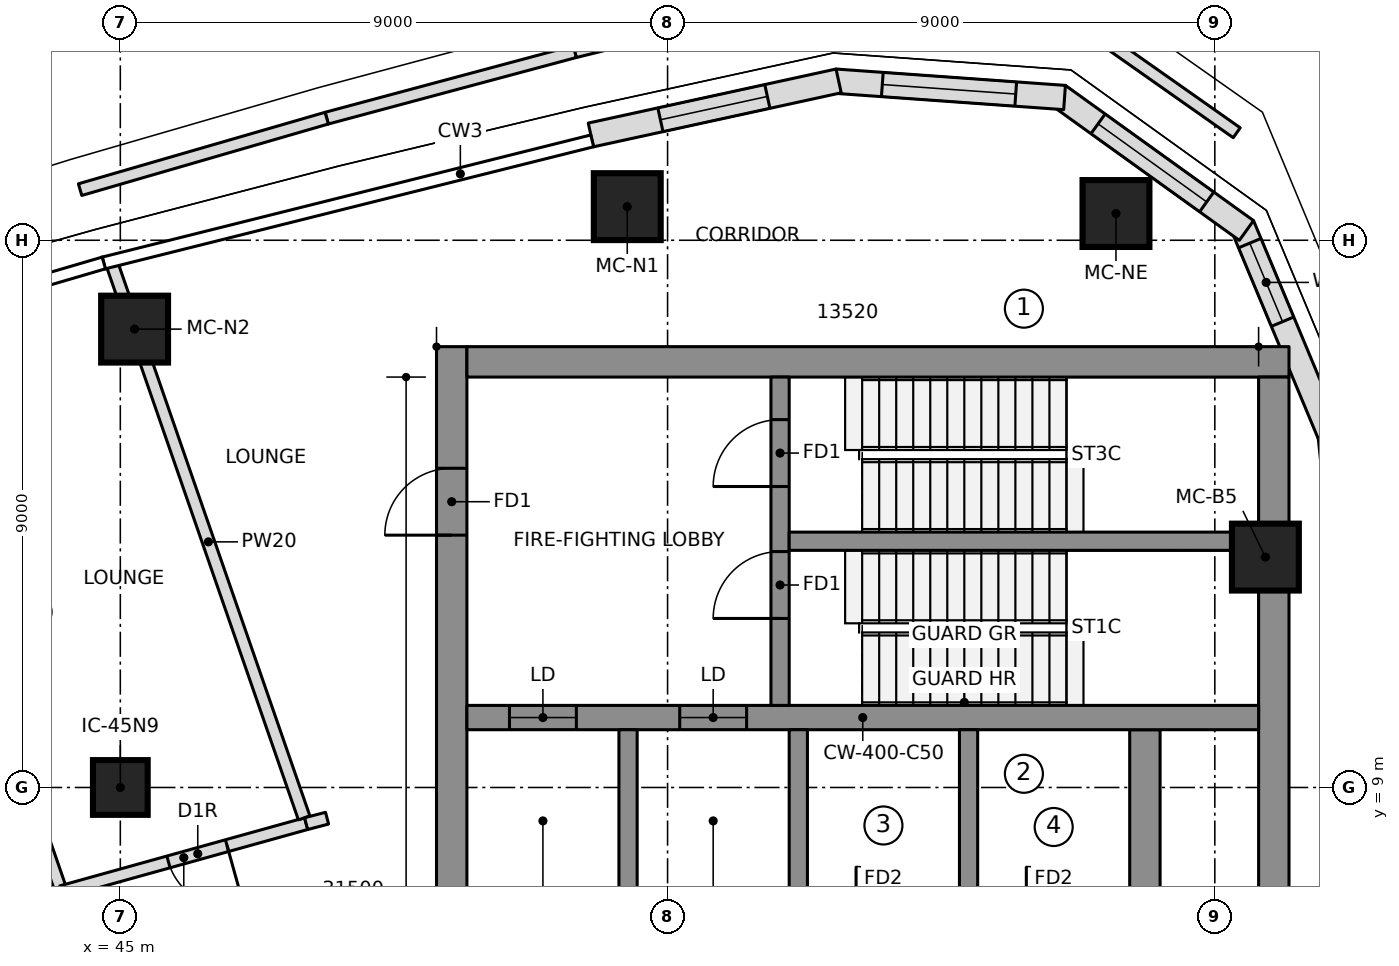
"""IFC4 building model, lengths in metres.
Left out: names, types, materials, properties, quantities, classifications, styles, units other than length and angle.
Written with IfcOpenShell. Run it as: python <this file> out.ifc"""

import sys

from ifc_helpers import new_model, si_unit, direction, frame, frame_2d, origin, origin_2d, place, context, subcontext, project, spatial, polyline, rectangle, outline, extrude, element, fill, save


model = new_model("IFC4")
c1 = context("Model", 3, precision=1e-05, world=origin(), true_north=direction((0.0, 1.0)))
c2 = subcontext(c1, "Body", "Model", "MODEL_VIEW")
j1 = project(units=[si_unit("LENGTHUNIT", "METRE"), si_unit("PLANEANGLEUNIT", "RADIAN")], contexts=[c1])
p1 = place(None, origin())
s1 = spatial("IfcSite", under=j1, at=p1, CompositionType="ELEMENT")
p2 = place(p1, origin())
s2 = spatial("IfcBuilding", under=s1, at=p2, CompositionType="ELEMENT")
p3 = place(p2, frame((0.0, 0.0, 263.3)))
s3 = spatial("IfcBuildingStorey", under=s2, at=p3, CompositionType="ELEMENT", Elevation=263.3)
p4 = place(p3, frame((50.45, 6.65, 0.0), z_axis=(0.0, 0.0, 1.0), x_axis=(0.0, 1.0, 0.0)))
e1 = element("IfcWall", 1, at=p4, inside=s3, PredefinedType="SHEAR", context=c2, shape_type="SweptSolid", body=[
    extrude(rectangle(XDim=9.6, YDim=0.5, at=frame_2d((4.8, 0.0))), origin(), (0.0, 0.0, 1.0), 4.6),
])
p5 = place(p4, frame((6.5, 0.0, 0.0)))
e2 = element("IfcOpeningElement", 2, at=p5, cuts=e1, PredefinedType="OPENING", context=c2, shape_type="SweptSolid", body=[
    extrude(rectangle(XDim=1.1, YDim=2.1, at=frame_2d((0.55, 1.05))), frame((0.0, 0.26, 0.0), z_axis=(0.0, -1.0, 0.0), x_axis=(1.0, 0.0, 0.0)), (0.0, 0.0, 1.0), 0.52),
])
p6 = place(p3, frame((50.7, 16.0, 0.0), z_axis=(0.0, 0.0, 1.0), x_axis=(1.0, 0.0, 0.0)))
e3 = element("IfcWall", 3, at=p6, inside=s3, PredefinedType="SHEAR", context=c2, shape_type="SweptSolid", body=[
    extrude(rectangle(XDim=13.52, YDim=0.5, at=frame_2d((6.76, 0.0))), origin(), (0.0, 0.0, 1.0), 4.6),
])
p7 = place(p3, frame((63.97, 6.903, 0.0), z_axis=(0.0, 0.0, 1.0), x_axis=(0.0, 1.0, 0.0)))
e4 = element("IfcWall", 4, at=p7, inside=s3, PredefinedType="SHEAR", context=c2, shape_type="SweptSolid", body=[
    extrude(rectangle(XDim=8.847, YDim=0.5, at=frame_2d((4.423, 0.0))), origin(), (0.0, 0.0, 1.0), 4.6),
])
p8 = place(p3, frame((61.85, -9.95, 0.0), z_axis=(0.0, 0.0, 1.0), x_axis=(0.0, 1.0, 0.0)))
e5 = element("IfcWall", 5, at=p8, inside=s3, PredefinedType="SHEAR", context=c2, shape_type="SweptSolid", body=[
    extrude(rectangle(XDim=19.9, YDim=0.5, at=frame_2d((9.95, 0.0))), origin(), (0.0, 0.0, 1.0), 4.6),
])
p9 = place(p3, frame((50.7, 10.15, 0.0), z_axis=(0.0, 0.0, 1.0), x_axis=(1.0, 0.0, 0.0)))
e6 = element("IfcWall", 6, at=p9, inside=s3, PredefinedType="SHEAR", context=c2, shape_type="SweptSolid", body=[
    extrude(rectangle(XDim=13.02, YDim=0.4, at=frame_2d((6.51, 0.0))), origin(), (0.0, 0.0, 1.0), 4.6),
])
p10 = place(p9, frame((0.7, 0.0, 0.0)))
e7 = element("IfcOpeningElement", 7, at=p10, cuts=e6, PredefinedType="OPENING", context=c2, shape_type="SweptSolid", body=[
    extrude(rectangle(XDim=1.1, YDim=2.1, at=frame_2d((0.55, 1.05))), frame((0.0, 0.21, 0.0), z_axis=(0.0, -1.0, 0.0), x_axis=(1.0, 0.0, 0.0)), (0.0, 0.0, 1.0), 0.42),
])
p11 = place(p9, frame((3.5, 0.0, 0.0)))
e8 = element("IfcOpeningElement", 8, at=p11, cuts=e6, PredefinedType="OPENING", context=c2, shape_type="SweptSolid", body=[
    extrude(rectangle(XDim=1.1, YDim=2.1, at=frame_2d((0.55, 1.05))), frame((0.0, 0.21, 0.0), z_axis=(0.0, -1.0, 0.0), x_axis=(1.0, 0.0, 0.0)), (0.0, 0.0, 1.0), 0.42),
])
for number, where, z_axis, x_axis in (
    (9, (53.35, 6.95, 0.0), (0.0, 0.0, 1.0), (0.0, 1.0, 0.0)),
    (10, (56.15, 6.95, 0.0), (0.0, 0.0, 1.0), (0.0, 1.0, 0.0)),
    (11, (58.95, 6.95, 0.0), (0.0, 0.0, 1.0), (0.0, 1.0, 0.0)),
):
    element("IfcWall", number, at=place(p3, frame(where, z_axis=z_axis, x_axis=x_axis)), inside=s3, PredefinedType="SHEAR", context=c2, shape_type="SweptSolid", body=[
        extrude(rectangle(XDim=3.0, YDim=0.3, at=frame_2d((1.5, 0.0))), origin(), (0.0, 0.0, 1.0), 4.6),
    ])
p12 = place(p3, frame((55.85, 10.35, 0.0), z_axis=(0.0, 0.0, 1.0), x_axis=(0.0, 1.0, 0.0)))
e12 = element("IfcWall", 12, at=p12, inside=s3, PredefinedType="SHEAR", context=c2, shape_type="SweptSolid", body=[
    extrude(rectangle(XDim=5.4, YDim=0.3, at=frame_2d((2.7, 0.0))), origin(), (0.0, 0.0, 1.0), 4.6),
])
p13 = place(p12, frame((1.43, 0.0, 0.0)))
e13 = element("IfcOpeningElement", 13, at=p13, cuts=e12, PredefinedType="OPENING", context=c2, shape_type="SweptSolid", body=[
    extrude(rectangle(XDim=1.1, YDim=2.1, at=frame_2d((0.55, 1.05))), frame((0.0, 0.16, 0.0), z_axis=(0.0, -1.0, 0.0), x_axis=(1.0, 0.0, 0.0)), (0.0, 0.0, 1.0), 0.32),
])
p14 = place(p12, frame((3.6, 0.0, 0.0)))
e14 = element("IfcOpeningElement", 14, at=p14, cuts=e12, PredefinedType="OPENING", context=c2, shape_type="SweptSolid", body=[
    extrude(rectangle(XDim=1.1, YDim=2.1, at=frame_2d((0.55, 1.05))), frame((0.0, 0.16, 0.0), z_axis=(0.0, -1.0, 0.0), x_axis=(1.0, 0.0, 0.0)), (0.0, 0.0, 1.0), 0.32),
])
p15 = place(p3, frame((56.0, 13.05, 0.0), z_axis=(0.0, 0.0, 1.0), x_axis=(1.0, 0.0, 0.0)))
e15 = element("IfcWall", 15, at=p15, inside=s3, PredefinedType="SHEAR", context=c2, shape_type="SweptSolid", body=[
    extrude(rectangle(XDim=7.72, YDim=0.3, at=frame_2d((3.86, 0.0))), origin(), (0.0, 0.0, 1.0), 4.6),
])
for number, where, z_axis, x_axis in (
    (16, (63.832, 12.789, 0.0), (0.0, 0.0, 1.0), (1.0, 0.0, 0.0)),
    (17, (61.374, 18.44, 0.0), (0.0, 0.0, 1.0), (1.0, 0.0, 0.0)),
    (18, (53.337, 18.553, 0.0), (0.0, 0.0, 1.0), (1.0, 0.0, 0.0)),
    (19, (45.235, 16.539, 0.0), (0.0, 0.0, 1.0), (1.0, 0.0, 0.0)),
):
    element("IfcColumn", number, at=place(p3, frame(where, z_axis=z_axis, x_axis=x_axis)), inside=s3, PredefinedType="COLUMN", context=c2, shape_type="SweptSolid", body=[
        extrude(rectangle(XDim=1.1, YDim=1.1, at=origin_2d()), origin(), (0.0, 0.0, 1.0), 4.6),
    ])
p16 = place(p3, frame((45.0, 9.0, 0.0), z_axis=(0.0, 0.0, 1.0), x_axis=(1.0, 0.0, 0.0)))
e20 = element("IfcColumn", 20, at=p16, inside=s3, PredefinedType="COLUMN", context=c2, shape_type="SweptSolid", body=[
    extrude(rectangle(XDim=0.9, YDim=0.9, at=origin_2d()), origin(), (0.0, 0.0, 1.0), 4.6),
])
p17 = place(p3, frame((65.331, 10.571, 0.0), z_axis=(0.0, 0.0, 1.0), x_axis=(-0.102249826987, 0.994758751096, 0.0)))
e21 = element("IfcWall", 21, at=p17, inside=s3, PredefinedType="NOTDEFINED", context=c2, shape_type="SweptSolid", body=[
    extrude(outline(polyline([(-0.003, -0.2), (4.263, -0.2), (4.204, 0.2), (0.003, 0.2), (-0.003, -0.2)])), origin(), (0.0, 0.0, 1.0), 4.3),
])
p18 = place(p17, frame((0.717, 0.0, 1.8)))
e22 = element("IfcOpeningElement", 22, at=p18, cuts=e21, PredefinedType="OPENING", context=c2, shape_type="SweptSolid", body=[
    extrude(rectangle(XDim=1.8, YDim=1.2, at=frame_2d((0.9, 0.6))), frame((0.0, 0.21, 0.0), z_axis=(0.0, -1.0, 0.0), x_axis=(1.0, 0.0, 0.0)), (0.0, 0.0, 1.0), 0.42),
])
p19 = place(p3, frame((64.898, 14.782, 0.0), z_axis=(0.0, 0.0, 1.0), x_axis=(-0.385285857918, 0.922797273343, 0.0)))
e23 = element("IfcWall", 23, at=p19, inside=s3, PredefinedType="NOTDEFINED", context=c2, shape_type="SweptSolid", body=[
    extrude(outline(polyline([(-0.03, -0.2), (3.753, -0.2), (3.64, 0.2), (0.03, 0.2), (-0.03, -0.2)])), origin(), (0.0, 0.0, 1.0), 4.3),
])
p20 = place(p19, frame((2.035, 0.0, 0.6)))
e24 = element("IfcOpeningElement", 24, at=p20, cuts=e23, PredefinedType="OPENING", context=c2, shape_type="SweptSolid", body=[
    extrude(outline(polyline([(0.0, 1.75), (0.053, 2.018), (0.205, 2.245), (0.432, 2.397), (0.7, 2.45), (0.968, 2.397), (1.195, 2.245), (1.347, 2.018), (1.4, 1.75), (1.4, 0.7), (1.347, 0.432), (1.195, 0.205), (0.968, 0.053), (0.7, 0.0), (0.432, 0.053), (0.205, 0.205), (0.053, 0.432), (0.0, 0.7), (0.0, 1.75)])), frame((0.0, 0.21, 0.0), z_axis=(0.0, -1.0, 0.0), x_axis=(1.0, 0.0, 0.0)), (0.0, 0.0, 1.0), 0.42),
])
p21 = place(p3, frame((63.474, 18.194, 0.0), z_axis=(0.0, 0.0, 1.0), x_axis=(-0.811962548682, 0.583709533533, 0.0)))
e25 = element("IfcWall", 25, at=p21, inside=s3, PredefinedType="NOTDEFINED", context=c2, shape_type="SweptSolid", body=[
    extrude(outline(polyline([(-0.057, -0.2), (3.753, -0.2), (3.64, 0.2), (0.057, 0.2), (-0.057, -0.2)])), origin(), (0.0, 0.0, 1.0), 4.3),
])
p22 = place(p21, frame((0.748, 0.0, 0.6)))
e26 = element("IfcOpeningElement", 26, at=p22, cuts=e25, PredefinedType="OPENING", context=c2, shape_type="SweptSolid", body=[
    extrude(outline(polyline([(0.0, 1.35), (0.084, 1.771), (0.322, 2.128), (0.679, 2.366), (1.1, 2.45), (1.521, 2.366), (1.878, 2.128), (2.116, 1.771), (2.2, 1.35), (2.2, 1.1), (2.116, 0.679), (1.878, 0.322), (1.521, 0.084), (1.1, 0.0), (0.679, 0.084), (0.322, 0.322), (0.084, 0.679), (0.0, 1.1), (0.0, 1.35)])), frame((0.0, 0.21, 0.0), z_axis=(0.0, -1.0, 0.0), x_axis=(1.0, 0.0, 0.0)), (0.0, 0.0, 1.0), 0.42),
])
p23 = place(p3, frame((60.472, 20.352, 0.0), z_axis=(0.0, 0.0, 1.0), x_axis=(-0.99746272096, 0.071190731806, 0.0)))
e27 = element("IfcWall", 27, at=p23, inside=s3, PredefinedType="NOTDEFINED", context=c2, shape_type="SweptSolid", body=[
    extrude(outline(polyline([(-0.057, -0.2), (3.726, -0.2), (3.668, 0.2), (0.057, 0.2), (-0.057, -0.2)])), origin(), (0.0, 0.0, 1.0), 4.3),
])
p24 = place(p23, frame((0.748, 0.0, 0.6)))
e28 = element("IfcOpeningElement", 28, at=p24, cuts=e27, PredefinedType="OPENING", context=c2, shape_type="SweptSolid", body=[
    extrude(outline(polyline([(0.0, 1.35), (0.084, 1.771), (0.322, 2.128), (0.679, 2.366), (1.1, 2.45), (1.521, 2.366), (1.878, 2.128), (2.116, 1.771), (2.2, 1.35), (2.2, 1.1), (2.116, 0.679), (1.878, 0.322), (1.521, 0.084), (1.1, 0.0), (0.679, 0.084), (0.322, 0.322), (0.084, 0.679), (0.0, 1.1), (0.0, 1.35)])), frame((0.0, 0.21, 0.0), z_axis=(0.0, -1.0, 0.0), x_axis=(1.0, 0.0, 0.0)), (0.0, 0.0, 1.0), 0.42),
])
p25 = place(p3, frame((56.785, 20.615, 0.0), z_axis=(0.0, 0.0, 1.0), x_axis=(-0.977020225348, -0.213146614471, 0.0)))
e29 = element("IfcWall", 29, at=p25, inside=s3, PredefinedType="NOTDEFINED", context=c2, shape_type="SweptSolid", body=[
    extrude(outline(polyline([(-0.029, -0.2), (4.142, -0.2), (4.142, 0.2), (0.029, 0.2), (-0.029, -0.2)])), origin(), (0.0, 0.0, 1.0), 4.3),
])
p26 = place(p25, frame((1.171, 0.0, 1.8)))
e30 = element("IfcOpeningElement", 30, at=p26, cuts=e29, PredefinedType="OPENING", context=c2, shape_type="SweptSolid", body=[
    extrude(rectangle(XDim=1.8, YDim=1.2, at=frame_2d((0.9, 0.6))), frame((0.0, 0.21, 0.0), z_axis=(0.0, -1.0, 0.0), x_axis=(1.0, 0.0, 0.0)), (0.0, 0.0, 1.0), 0.42),
])
p27 = place(p3, frame((63.36, 19.768, 0.0), z_axis=(0.0, 0.0, 1.0), x_axis=(-0.817908975585, 0.575347640699, 0.0)))
e31 = element("IfcWall", 31, at=p27, inside=s3, PredefinedType="PARAPET", context=c2, shape_type="SweptSolid", body=[
    extrude(rectangle(XDim=3.734, YDim=0.2, at=frame_2d((1.867, 0.0))), origin(), (0.0, 0.0, 1.0), 1.1),
])
p28 = place(p3, frame((56.538, 22.105, 0.0), z_axis=(0.0, 0.0, 1.0), x_axis=(-0.970892517903, -0.239515591724, 0.0)))
e32 = element("IfcWall", 32, at=p28, inside=s3, PredefinedType="PARAPET", context=c2, shape_type="SweptSolid", body=[
    extrude(rectangle(XDim=4.186, YDim=0.2, at=frame_2d((2.093, 0.0))), origin(), (0.0, 0.0, 1.0), 1.1),
])
p29 = place(p3, frame((52.473, 21.102, 0.0), z_axis=(0.0, 0.0, 1.0), x_axis=(-0.965877060865, -0.259000971609, 0.0)))
e33 = element("IfcWall", 33, at=p29, inside=s3, PredefinedType="PARAPET", context=c2, shape_type="SweptSolid", body=[
    extrude(rectangle(XDim=4.223, YDim=0.2, at=frame_2d((2.111, 0.0))), origin(), (0.0, 0.0, 1.0), 1.1),
])
p30 = place(p3, frame((48.395, 20.008, 0.0), z_axis=(0.0, 0.0, 1.0), x_axis=(-0.960476446862, -0.278361267103, 0.0)))
e34 = element("IfcWall", 34, at=p30, inside=s3, PredefinedType="PARAPET", context=c2, shape_type="SweptSolid", body=[
    extrude(rectangle(XDim=4.223, YDim=0.2, at=frame_2d((2.112, 0.0))), origin(), (0.0, 0.0, 1.0), 1.1),
])
p31 = place(p3, frame((44.038, 7.267, 0.0), z_axis=(0.0, 0.0, 1.0), x_axis=(-0.327714576096, 0.944776776077, 0.0)))
e35 = element("IfcWall", 35, at=p31, inside=s3, PredefinedType="PARTITIONING", context=c2, shape_type="SweptSolid", body=[
    extrude(rectangle(XDim=9.717, YDim=0.2, at=frame_2d((4.858, 0.0))), origin(), (0.0, 0.0, 1.0), 4.3),
])
p32 = place(p3, frame((48.056, 8.405, 0.0), z_axis=(0.0, 0.0, 1.0), x_axis=(-0.963429942227, -0.267960344866, 0.0)))
e36 = element("IfcWall", 36, at=p32, inside=s3, PredefinedType="PARTITIONING", context=c2, shape_type="SweptSolid", body=[
    extrude(rectangle(XDim=4.177, YDim=0.2, at=frame_2d((2.089, 0.0))), origin(), (0.0, 0.0, 1.0), 4.3),
])
p33 = place(p32, frame((1.35, 0.0, 0.0)))
e37 = element("IfcOpeningElement", 37, at=p33, cuts=e36, PredefinedType="OPENING", context=c2, shape_type="SweptSolid", body=[
    extrude(rectangle(XDim=1.0, YDim=2.1, at=frame_2d((0.5, 1.05))), frame((0.0, 0.11, 0.0), z_axis=(0.0, -1.0, 0.0), x_axis=(1.0, 0.0, 0.0)), (0.0, 0.0, 1.0), 0.22),
])
p34 = place(p3, frame((48.023, 8.5, 0.0), z_axis=(0.0, 0.0, 1.0), x_axis=(-0.327705598625, 0.944779890043, 0.0)))
e38 = element("IfcWall", 38, at=p34, inside=s3, PredefinedType="PARTITIONING", context=c2, shape_type="SweptSolid", body=[
    extrude(rectangle(XDim=9.61, YDim=0.2, at=frame_2d((4.805, 0.0))), origin(), (0.0, 0.0, 1.0), 4.3),
])
p35 = place(p3, frame((48.4, 8.495, 0.0), z_axis=(0.0, 0.0, 1.0), x_axis=(-0.96754430933, -0.252701423587, 0.0)))
e39 = element("IfcWall", 39, at=p35, inside=s3, PredefinedType="PARTITIONING", context=c2, shape_type="SweptSolid", body=[
    extrude(rectangle(XDim=0.355, YDim=0.2, at=frame_2d((0.178, 0.0))), origin(), (0.0, 0.0, 1.0), 4.3),
])
p36 = place(p20, origin())
e40 = element("IfcWindow", 40, at=p36, inside=s3, PartitioningType="SINGLE_PANEL", PredefinedType="WINDOW", context=c2, shape_type="SweptSolid", body=[
    extrude(outline(polyline([(0.0, 1.75), (0.053, 2.018), (0.205, 2.245), (0.432, 2.397), (0.7, 2.45), (0.968, 2.397), (1.195, 2.245), (1.347, 2.018), (1.4, 1.75), (1.4, 0.7), (1.347, 0.432), (1.195, 0.205), (0.968, 0.053), (0.7, 0.0), (0.432, 0.053), (0.205, 0.205), (0.053, 0.432), (0.0, 0.7), (0.0, 1.75)])), frame((0.0, 0.17, 0.0), z_axis=(0.0, -1.0, 0.0), x_axis=(1.0, 0.0, 0.0)), (0.0, 0.0, 1.0), 0.06),
])
fill(e24, e40)
p37 = place(p22, origin())
e41 = element("IfcWindow", 41, at=p37, inside=s3, PartitioningType="SINGLE_PANEL", PredefinedType="WINDOW", context=c2, shape_type="SweptSolid", body=[
    extrude(outline(polyline([(0.0, 1.35), (0.084, 1.771), (0.322, 2.128), (0.679, 2.366), (1.1, 2.45), (1.521, 2.366), (1.878, 2.128), (2.116, 1.771), (2.2, 1.35), (2.2, 1.1), (2.116, 0.679), (1.878, 0.322), (1.521, 0.084), (1.1, 0.0), (0.679, 0.084), (0.322, 0.322), (0.084, 0.679), (0.0, 1.1), (0.0, 1.35)])), frame((0.0, 0.17, 0.0), z_axis=(0.0, -1.0, 0.0), x_axis=(1.0, 0.0, 0.0)), (0.0, 0.0, 1.0), 0.06),
])
fill(e26, e41)
p38 = place(p24, origin())
e42 = element("IfcWindow", 42, at=p38, inside=s3, PartitioningType="SINGLE_PANEL", PredefinedType="WINDOW", context=c2, shape_type="SweptSolid", body=[
    extrude(outline(polyline([(0.0, 1.35), (0.084, 1.771), (0.322, 2.128), (0.679, 2.366), (1.1, 2.45), (1.521, 2.366), (1.878, 2.128), (2.116, 1.771), (2.2, 1.35), (2.2, 1.1), (2.116, 0.679), (1.878, 0.322), (1.521, 0.084), (1.1, 0.0), (0.679, 0.084), (0.322, 0.322), (0.084, 0.679), (0.0, 1.1), (0.0, 1.35)])), frame((0.0, 0.17, 0.0), z_axis=(0.0, -1.0, 0.0), x_axis=(1.0, 0.0, 0.0)), (0.0, 0.0, 1.0), 0.06),
])
fill(e28, e42)
p39 = place(p26, origin())
e43 = element("IfcWindow", 43, at=p39, inside=s3, PartitioningType="SINGLE_PANEL", PredefinedType="WINDOW", context=c2, shape_type="SweptSolid", body=[
    extrude(rectangle(XDim=1.8, YDim=1.2, at=frame_2d((0.9, 0.6))), frame((0.0, 0.17, 0.0), z_axis=(0.0, -1.0, 0.0), x_axis=(1.0, 0.0, 0.0)), (0.0, 0.0, 1.0), 0.06),
])
fill(e30, e43)
p40 = place(p33, origin())
e44 = element("IfcDoor", 44, at=p40, inside=s3, OperationType="SINGLE_SWING_RIGHT", PredefinedType="DOOR", context=c2, shape_type="SweptSolid", body=[
    extrude(rectangle(XDim=1.0, YDim=2.1, at=frame_2d((0.5, 1.05))), frame((0.0, 0.025, 0.0), z_axis=(0.0, -1.0, 0.0), x_axis=(1.0, 0.0, 0.0)), (0.0, 0.0, 1.0), 0.05),
])
fill(e37, e44)
p41 = place(p10, origin())
e45 = element("IfcDoor", 45, at=p41, inside=s3, OperationType="DOUBLE_DOOR_SLIDING", PredefinedType="DOOR", context=c2, shape_type="SweptSolid", body=[
    extrude(rectangle(XDim=1.1, YDim=2.1, at=frame_2d((0.55, 1.05))), frame((0.0, 0.025, 0.0), z_axis=(0.0, -1.0, 0.0), x_axis=(1.0, 0.0, 0.0)), (0.0, 0.0, 1.0), 0.05),
])
fill(e7, e45)
p42 = place(p11, origin())
e46 = element("IfcDoor", 46, at=p42, inside=s3, OperationType="DOUBLE_DOOR_SLIDING", PredefinedType="DOOR", context=c2, shape_type="SweptSolid", body=[
    extrude(rectangle(XDim=1.1, YDim=2.1, at=frame_2d((0.55, 1.05))), frame((0.0, 0.025, 0.0), z_axis=(0.0, -1.0, 0.0), x_axis=(1.0, 0.0, 0.0)), (0.0, 0.0, 1.0), 0.05),
])
fill(e8, e46)
p43 = place(p13, origin())
e47 = element("IfcDoor", 47, at=p43, inside=s3, OperationType="SINGLE_SWING_RIGHT", PredefinedType="DOOR", context=c2, shape_type="SweptSolid", body=[
    extrude(rectangle(XDim=1.1, YDim=2.1, at=frame_2d((0.55, 1.05))), frame((0.0, 0.025, 0.0), z_axis=(0.0, -1.0, 0.0), x_axis=(1.0, 0.0, 0.0)), (0.0, 0.0, 1.0), 0.05),
])
fill(e13, e47)
p44 = place(p14, origin())
e48 = element("IfcDoor", 48, at=p44, inside=s3, OperationType="SINGLE_SWING_RIGHT", PredefinedType="DOOR", context=c2, shape_type="SweptSolid", body=[
    extrude(rectangle(XDim=1.1, YDim=2.1, at=frame_2d((0.55, 1.05))), frame((0.0, 0.025, 0.0), z_axis=(0.0, -1.0, 0.0), x_axis=(1.0, 0.0, 0.0)), (0.0, 0.0, 1.0), 0.05),
])
fill(e14, e48)
p45 = place(p5, origin())
e49 = element("IfcDoor", 49, at=p45, inside=s3, OperationType="SINGLE_SWING_RIGHT", PredefinedType="DOOR", context=c2, shape_type="SweptSolid", body=[
    extrude(rectangle(XDim=1.1, YDim=2.1, at=frame_2d((0.55, 1.05))), frame((0.0, 0.025, 0.0), z_axis=(0.0, -1.0, 0.0), x_axis=(1.0, 0.0, 0.0)), (0.0, 0.0, 1.0), 0.05),
])
fill(e2, e49)
save(model, sys.argv[1])
